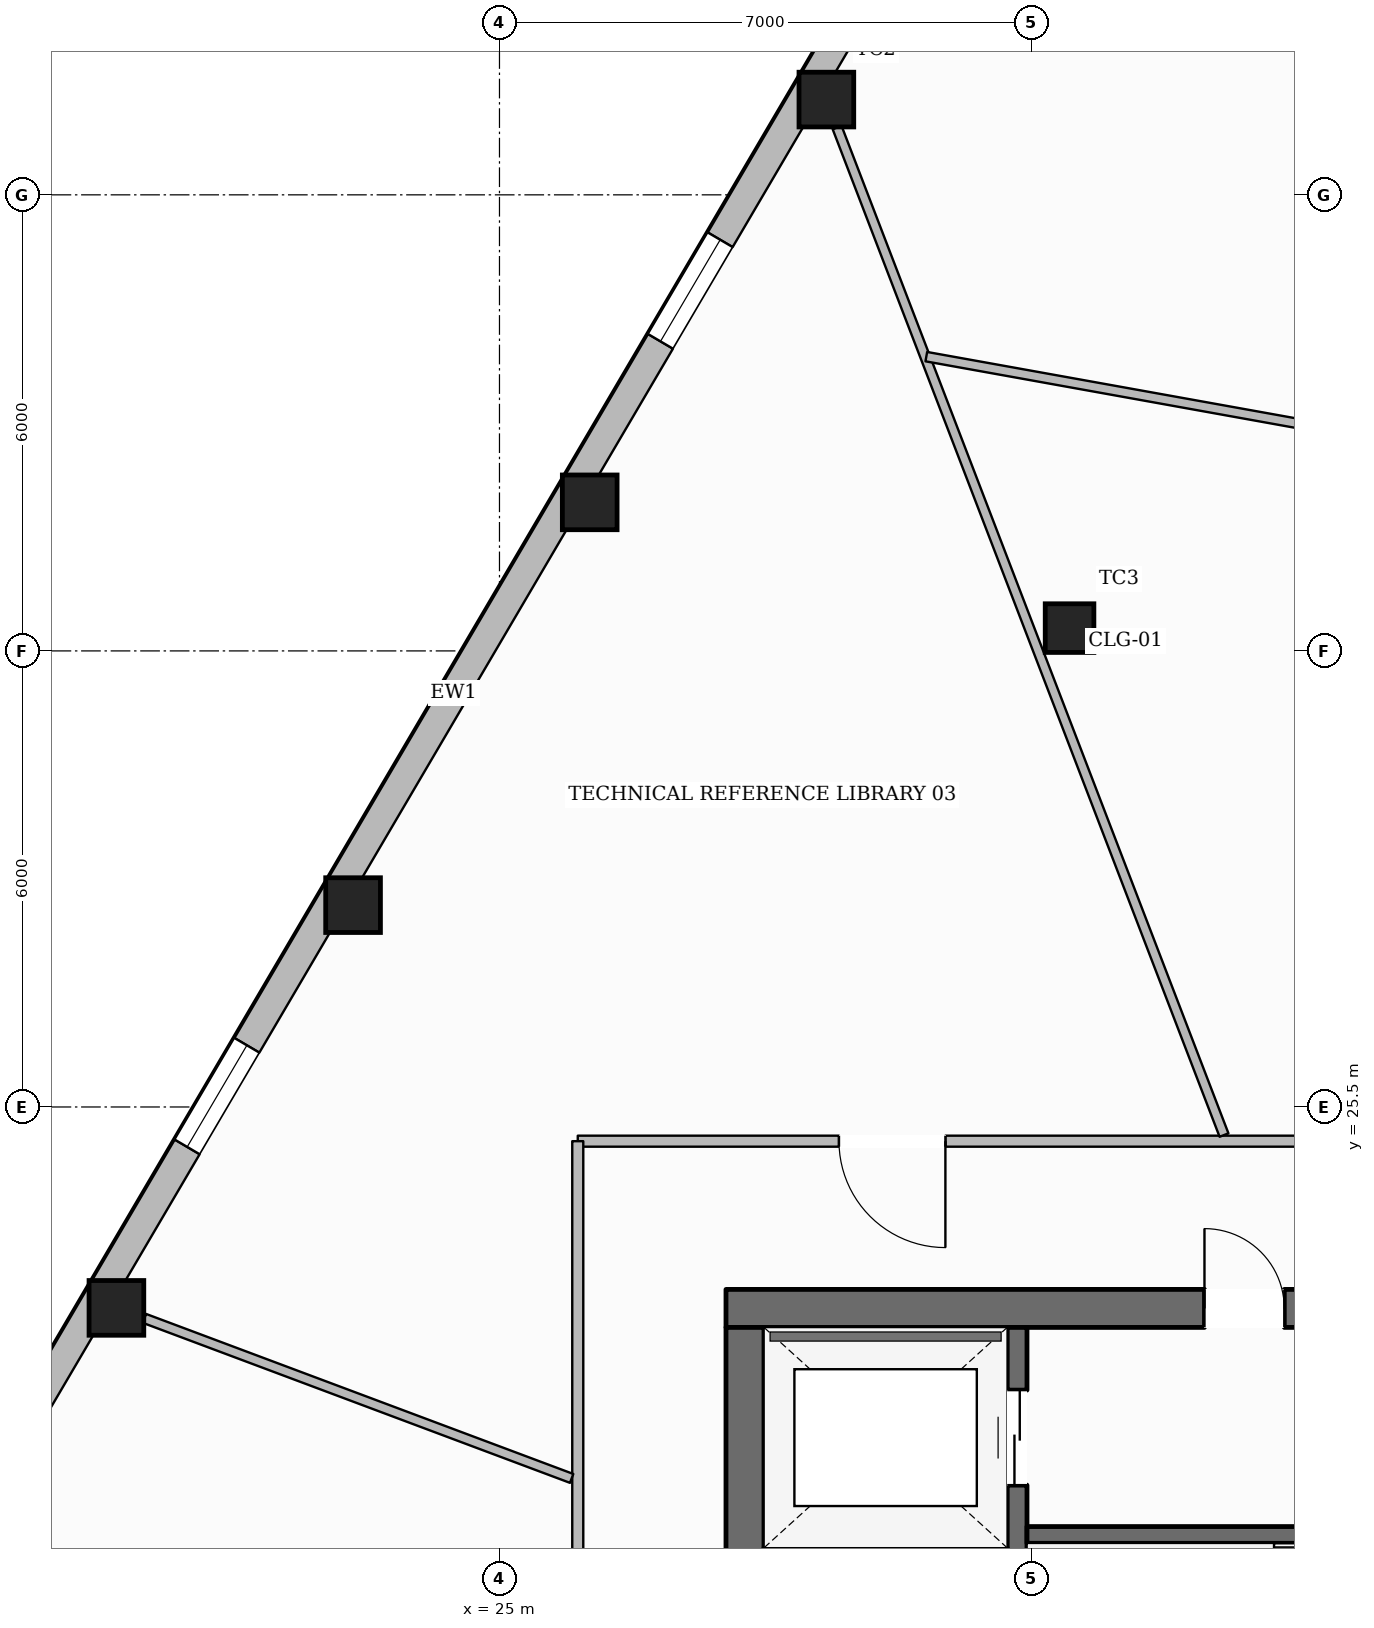
"""IFC4 building model, lengths in metres.
Left out: names, types, materials, properties, quantities, classifications, styles, units other than length and angle.
Written with IfcOpenShell. Run it as: python <this file> out.ifc"""

import sys

from ifc_helpers import new_model, si_unit, direction, frame, frame_2d, origin, origin_2d, place, context, subcontext, project, spatial, rectangle, hollow_rectangle, extrude, element, fill, save


model = new_model("IFC4")
c1 = context("Model", 3, precision=1e-05, world=origin(), true_north=direction((0.0, 1.0)))
c2 = subcontext(c1, "Body", "Model", "MODEL_VIEW")
j1 = project(units=[si_unit("LENGTHUNIT", "METRE"), si_unit("PLANEANGLEUNIT", "RADIAN")], contexts=[c1])
p1 = place(None, origin())
s1 = spatial("IfcSite", under=j1, at=p1, CompositionType="ELEMENT")
p2 = place(p1, origin())
s2 = spatial("IfcBuilding", under=s1, at=p2, CompositionType="ELEMENT")
p3 = place(p2, frame((0.0, 0.0, 139.4)))
s3 = spatial("IfcBuildingStorey", under=s2, at=p3, CompositionType="ELEMENT", Elevation=139.4)
p4 = place(p3, frame((27.98, 22.85, 0.0), z_axis=(0.0, 0.0, 1.0), x_axis=(1.0, 0.0, 0.0)))
e1 = element("IfcWall", 1, at=p4, inside=s3, PredefinedType="SOLIDWALL", context=c2, shape_type="SweptSolid", body=[
    extrude(rectangle(XDim=20.04, YDim=0.5, at=frame_2d((10.02, 0.0))), origin(), (0.0, 0.0, 1.0), 3.6),
])
p5 = place(p4, frame((6.295, 0.0, 0.0)))
e2 = element("IfcOpeningElement", 2, at=p5, cuts=e1, PredefinedType="OPENING", context=c2, shape_type="SweptSolid", body=[
    extrude(rectangle(XDim=1.05, YDim=2.15, at=frame_2d((0.525, 1.075))), frame((0.0, 0.26, 0.0), z_axis=(0.0, -1.0, 0.0), x_axis=(1.0, 0.0, 0.0)), (0.0, 0.0, 1.0), 0.52),
])
p6 = place(p4, frame((12.695, 0.0, 0.0)))
e3 = element("IfcOpeningElement", 3, at=p6, cuts=e1, PredefinedType="OPENING", context=c2, shape_type="SweptSolid", body=[
    extrude(rectangle(XDim=1.05, YDim=2.15, at=frame_2d((0.525, 1.075))), frame((0.0, 0.26, 0.0), z_axis=(0.0, -1.0, 0.0), x_axis=(1.0, 0.0, 0.0)), (0.0, 0.0, 1.0), 0.52),
])
p7 = place(p3, frame((28.23, 9.6, 0.0), z_axis=(0.0, 0.0, 1.0), x_axis=(0.0, 1.0, 0.0)))
e4 = element("IfcWall", 4, at=p7, inside=s3, PredefinedType="SOLIDWALL", context=c2, shape_type="SweptSolid", body=[
    extrude(rectangle(XDim=13.0, YDim=0.5, at=frame_2d((6.5, 0.0))), origin(), (0.0, 0.0, 1.0), 3.6),
])
p8 = place(p7, frame((0.2, 0.0, 0.0)))
e5 = element("IfcOpeningElement", 5, at=p8, cuts=e4, PredefinedType="OPENING", context=c2, shape_type="SweptSolid", body=[
    extrude(rectangle(XDim=1.1, YDim=2.15, at=frame_2d((0.55, 1.075))), frame((0.0, 0.26, 0.0), z_axis=(0.0, -1.0, 0.0), x_axis=(1.0, 0.0, 0.0)), (0.0, 0.0, 1.0), 0.52),
])
p9 = place(p7, frame((8.4, 0.0, 0.0)))
e6 = element("IfcOpeningElement", 6, at=p9, cuts=e4, PredefinedType="OPENING", context=c2, shape_type="SweptSolid", body=[
    extrude(rectangle(XDim=0.9, YDim=2.1, at=frame_2d((0.45, 1.05))), frame((0.0, 0.26, 0.0), z_axis=(0.0, -1.0, 0.0), x_axis=(1.0, 0.0, 0.0)), (0.0, 0.0, 1.0), 0.52),
])
p10 = place(p3, frame((31.81, 9.6, 0.0), z_axis=(0.0, 0.0, 1.0), x_axis=(0.0, 1.0, 0.0)))
e7 = element("IfcWall", 7, at=p10, inside=s3, PredefinedType="SHEAR", context=c2, shape_type="SweptSolid", body=[
    extrude(rectangle(XDim=13.0, YDim=0.26, at=frame_2d((6.5, 0.0))), origin(), (0.0, 0.0, 1.0), 3.6),
])
p11 = place(p10, frame((10.925, 0.0, 0.0)))
e8 = element("IfcOpeningElement", 8, at=p11, cuts=e7, PredefinedType="OPENING", context=c2, shape_type="SweptSolid", body=[
    extrude(rectangle(XDim=1.25, YDim=2.25, at=frame_2d((0.625, 1.125))), frame((0.0, 0.14, 0.0), z_axis=(0.0, -1.0, 0.0), x_axis=(1.0, 0.0, 0.0)), (0.0, 0.0, 1.0), 0.28),
])
p12 = place(p3, frame((28.48, 19.57, 0.0), z_axis=(0.0, 0.0, 1.0), x_axis=(1.0, 0.0, 0.0)))
e9 = element("IfcWall", 9, at=p12, inside=s3, PredefinedType="SHEAR", context=c2, shape_type="SweptSolid", body=[
    extrude(rectangle(XDim=3.2, YDim=0.26, at=frame_2d((1.6, 0.0))), origin(), (0.0, 0.0, 1.0), 3.6),
])
p13 = place(p3, frame((31.94, 19.87, 0.0), z_axis=(0.0, 0.0, 1.0), x_axis=(1.0, 0.0, 0.0)))
e10 = element("IfcWall", 10, at=p13, inside=s3, PredefinedType="SOLIDWALL", context=c2, shape_type="SweptSolid", body=[
    extrude(rectangle(XDim=12.12, YDim=0.22, at=frame_2d((6.06, 0.0))), origin(), (0.0, 0.0, 1.0), 3.6),
])
p14 = place(p13, frame((6.3, 0.0, 0.0)))
e11 = element("IfcOpeningElement", 11, at=p14, cuts=e10, PredefinedType="OPENING", context=c2, shape_type="SweptSolid", body=[
    extrude(rectangle(XDim=1.1, YDim=2.15, at=frame_2d((0.55, 1.075))), frame((0.0, 0.12, 0.0), z_axis=(0.0, -1.0, 0.0), x_axis=(1.0, 0.0, 0.0)), (0.0, 0.0, 1.0), 0.24),
])
p15 = place(p13, frame((8.23, 0.0, 0.0)))
e12 = element("IfcOpeningElement", 12, at=p15, cuts=e10, PredefinedType="OPENING", context=c2, shape_type="SweptSolid", body=[
    extrude(rectangle(XDim=0.9, YDim=2.1, at=frame_2d((0.45, 1.05))), frame((0.0, 0.12, 0.0), z_axis=(0.0, -1.0, 0.0), x_axis=(1.0, 0.0, 0.0)), (0.0, 0.0, 1.0), 0.24),
])
p16 = place(p13, frame((10.45, 0.0, 0.0)))
e13 = element("IfcOpeningElement", 13, at=p16, cuts=e10, PredefinedType="OPENING", context=c2, shape_type="SweptSolid", body=[
    extrude(rectangle(XDim=0.9, YDim=2.1, at=frame_2d((0.45, 1.05))), frame((0.0, 0.12, 0.0), z_axis=(0.0, -1.0, 0.0), x_axis=(1.0, 0.0, 0.0)), (0.0, 0.0, 1.0), 0.24),
])
for number, where, z_axis, x_axis in (
    (14, (29.301, 38.753, 0.0), (0.0, 0.0, 1.0), (1.0, 0.0, 0.0)),
    (15, (26.187, 33.454, 0.0), (0.0, 0.0, 1.0), (1.0, 0.0, 0.0)),
    (16, (23.074, 28.156, 0.0), (0.0, 0.0, 1.0), (1.0, 0.0, 0.0)),
    (17, (19.96, 22.857, 0.0), (0.0, 0.0, 1.0), (1.0, 0.0, 0.0)),
):
    element("IfcColumn", number, at=place(p3, frame(where, z_axis=z_axis, x_axis=x_axis)), inside=s3, PredefinedType="COLUMN", context=c2, shape_type="SweptSolid", body=[
        extrude(hollow_rectangle(XDim=0.72, YDim=0.72, WallThickness=0.032, at=origin_2d()), origin(), (0.0, 0.0, 1.0), 3.6),
    ])
p17 = place(p3, frame((32.5, 31.8, 0.0), z_axis=(0.0, 0.0, 1.0), x_axis=(1.0, 0.0, 0.0)))
e18 = element("IfcColumn", 18, at=p17, inside=s3, PredefinedType="COLUMN", context=c2, shape_type="SweptSolid", body=[
    extrude(hollow_rectangle(XDim=0.64, YDim=0.64, WallThickness=0.028, at=origin_2d()), origin(), (0.0, 0.0, 1.0), 3.6),
])
p18 = place(p3, frame((13.257, 11.982, 0.0), z_axis=(0.0, 0.0, 1.0), x_axis=(0.506593608381, 0.862184966204, 0.0)))
e19 = element("IfcWall", 19, at=p18, inside=s3, PredefinedType="STANDARD", context=c2, shape_type="SweptSolid", body=[
    extrude(rectangle(XDim=37.828, YDim=0.38, at=frame_2d((18.914, 0.0))), origin(), (0.0, 0.0, 1.0), 3.059),
])
p19 = place(p18, frame((33.507, 0.0, 0.65)))
e20 = element("IfcOpeningElement", 20, at=p19, cuts=e19, PredefinedType="OPENING", context=c2, shape_type="SweptSolid", body=[
    extrude(rectangle(XDim=1.55, YDim=1.75, at=frame_2d((0.775, 0.875))), frame((0.0, 0.2, 0.0), z_axis=(0.0, -1.0, 0.0), x_axis=(1.0, 0.0, 0.0)), (0.0, 0.0, 1.0), 0.4),
])
p20 = place(p18, frame((27.362, 0.0, 0.65)))
e21 = element("IfcOpeningElement", 21, at=p20, cuts=e19, PredefinedType="OPENING", context=c2, shape_type="SweptSolid", body=[
    extrude(rectangle(XDim=1.55, YDim=1.75, at=frame_2d((0.775, 0.875))), frame((0.0, 0.2, 0.0), z_axis=(0.0, -1.0, 0.0), x_axis=(1.0, 0.0, 0.0)), (0.0, 0.0, 1.0), 0.4),
])
p21 = place(p18, frame((15.07, 0.0, 0.65)))
e22 = element("IfcOpeningElement", 22, at=p21, cuts=e19, PredefinedType="OPENING", context=c2, shape_type="SweptSolid", body=[
    extrude(rectangle(XDim=1.55, YDim=1.75, at=frame_2d((0.775, 0.875))), frame((0.0, 0.2, 0.0), z_axis=(0.0, -1.0, 0.0), x_axis=(1.0, 0.0, 0.0)), (0.0, 0.0, 1.0), 0.4),
])
p22 = place(p18, frame((8.924, 0.0, 0.65)))
e23 = element("IfcOpeningElement", 23, at=p22, cuts=e19, PredefinedType="OPENING", context=c2, shape_type="SweptSolid", body=[
    extrude(rectangle(XDim=1.55, YDim=1.75, at=frame_2d((0.775, 0.875))), frame((0.0, 0.2, 0.0), z_axis=(0.0, -1.0, 0.0), x_axis=(1.0, 0.0, 0.0)), (0.0, 0.0, 1.0), 0.4),
])
p23 = place(p18, frame((2.778, 0.0, 0.65)))
e24 = element("IfcOpeningElement", 24, at=p23, cuts=e19, PredefinedType="OPENING", context=c2, shape_type="SweptSolid", body=[
    extrude(rectangle(XDim=1.55, YDim=1.75, at=frame_2d((0.775, 0.875))), frame((0.0, 0.2, 0.0), z_axis=(0.0, -1.0, 0.0), x_axis=(1.0, 0.0, 0.0)), (0.0, 0.0, 1.0), 0.4),
])
p24 = place(p3, frame((49.97, 25.05, 0.0), z_axis=(0.0, 0.0, 1.0), x_axis=(-1.0, 0.0, 0.0)))
e25 = element("IfcWall", 25, at=p24, inside=s3, PredefinedType="PARTITIONING", context=c2, shape_type="SweptSolid", body=[
    extrude(rectangle(XDim=23.94, YDim=0.145, at=frame_2d((11.97, 0.0))), origin(), (0.0, 0.0, 1.0), 3.6),
])
p25 = place(p24, frame((6.883, 0.0, 0.0)))
e26 = element("IfcOpeningElement", 26, at=p25, cuts=e25, PredefinedType="OPENING", context=c2, shape_type="SweptSolid", body=[
    extrude(rectangle(XDim=1.4, YDim=2.2, at=frame_2d((0.7, 1.1))), frame((0.0, 0.083, 0.0), z_axis=(0.0, -1.0, 0.0), x_axis=(1.0, 0.0, 0.0)), (0.0, 0.0, 1.0), 0.165),
])
p26 = place(p24, frame((19.104, 0.0, 0.0)))
e27 = element("IfcOpeningElement", 27, at=p26, cuts=e25, PredefinedType="OPENING", context=c2, shape_type="SweptSolid", body=[
    extrude(rectangle(XDim=1.4, YDim=2.2, at=frame_2d((0.7, 1.1))), frame((0.0, 0.083, 0.0), z_axis=(0.0, -1.0, 0.0), x_axis=(1.0, 0.0, 0.0)), (0.0, 0.0, 1.0), 0.165),
])
p27 = place(p3, frame((26.03, 25.05, 0.0), z_axis=(0.0, 0.0, 1.0), x_axis=(0.0, -1.0, 0.0)))
e28 = element("IfcWall", 28, at=p27, inside=s3, PredefinedType="PARTITIONING", context=c2, shape_type="SweptSolid", body=[
    extrude(rectangle(XDim=17.9, YDim=0.145, at=frame_2d((8.95, 0.0))), origin(), (0.0, 0.0, 1.0), 3.288),
])
p28 = place(p27, frame((8.676, 0.0, 0.0)))
e29 = element("IfcOpeningElement", 29, at=p28, cuts=e28, PredefinedType="OPENING", context=c2, shape_type="SweptSolid", body=[
    extrude(rectangle(XDim=1.4, YDim=2.2, at=frame_2d((0.7, 1.1))), frame((0.0, 0.083, 0.0), z_axis=(0.0, -1.0, 0.0), x_axis=(1.0, 0.0, 0.0)), (0.0, 0.0, 1.0), 0.165),
])
p29 = place(p3, frame((34.532, 25.131, 0.0), z_axis=(0.0, 0.0, 1.0), x_axis=(-0.358497395802, 0.933530726438, 0.0)))
e30 = element("IfcWall", 30, at=p29, inside=s3, PredefinedType="PARTITIONING", context=c2, shape_type="SweptSolid", body=[
    extrude(rectangle(XDim=14.198, YDim=0.125, at=frame_2d((7.099, 0.0))), origin(), (0.0, 0.0, 1.0), 3.141),
])
p30 = place(p3, frame((25.949, 20.614, 0.0), z_axis=(0.0, 0.0, 1.0), x_axis=(-0.936462830217, 0.350766827996, 0.0)))
e31 = element("IfcWall", 31, at=p30, inside=s3, PredefinedType="PARTITIONING", context=c2, shape_type="SweptSolid", body=[
    extrude(rectangle(XDim=6.002, YDim=0.125, at=frame_2d((3.001, 0.0))), origin(), (0.0, 0.0, 1.0), 3.6),
])
p31 = place(p3, frame((50.79, 31.741, 0.0), z_axis=(0.0, 0.0, 1.0), x_axis=(-0.984196030072, 0.177082394355, 0.0)))
e32 = element("IfcWall", 32, at=p31, inside=s3, PredefinedType="PARTITIONING", context=c2, shape_type="SweptSolid", body=[
    extrude(rectangle(XDim=20.498, YDim=0.125, at=frame_2d((10.249, 0.0))), origin(), (0.0, 0.0, 1.0), 3.288),
])
p32 = place(p31, frame((9.618, 0.0, 0.0)))
e33 = element("IfcOpeningElement", 33, at=p32, cuts=e32, PredefinedType="OPENING", context=c2, shape_type="SweptSolid", body=[
    extrude(rectangle(XDim=1.02, YDim=2.15, at=frame_2d((0.51, 1.075))), frame((0.0, 0.073, 0.0), z_axis=(0.0, -1.0, 0.0), x_axis=(1.0, 0.0, 0.0)), (0.0, 0.0, 1.0), 0.145),
])
p33 = place(p20, origin())
e34 = element("IfcWindow", 34, at=p33, inside=s3, PartitioningType="SINGLE_PANEL", PredefinedType="WINDOW", context=c2, shape_type="SweptSolid", body=[
    extrude(rectangle(XDim=1.55, YDim=1.75, at=frame_2d((0.775, 0.875))), frame((0.0, 0.03, 0.0), z_axis=(0.0, -1.0, 0.0), x_axis=(1.0, 0.0, 0.0)), (0.0, 0.0, 1.0), 0.06),
])
fill(e21, e34)
p34 = place(p21, origin())
e35 = element("IfcWindow", 35, at=p34, inside=s3, PartitioningType="SINGLE_PANEL", PredefinedType="WINDOW", context=c2, shape_type="SweptSolid", body=[
    extrude(rectangle(XDim=1.55, YDim=1.75, at=frame_2d((0.775, 0.875))), frame((0.0, 0.03, 0.0), z_axis=(0.0, -1.0, 0.0), x_axis=(1.0, 0.0, 0.0)), (0.0, 0.0, 1.0), 0.06),
])
fill(e22, e35)
p35 = place(p5, origin())
e36 = element("IfcDoor", 36, at=p35, inside=s3, OperationType="SINGLE_SWING_LEFT", PredefinedType="DOOR", context=c2, shape_type="SweptSolid", body=[
    extrude(rectangle(XDim=1.05, YDim=2.15, at=frame_2d((0.525, 1.075))), frame((0.0, 0.025, 0.0), z_axis=(0.0, -1.0, 0.0), x_axis=(1.0, 0.0, 0.0)), (0.0, 0.0, 1.0), 0.05),
])
fill(e2, e36)
p36 = place(p11, origin())
e37 = element("IfcDoor", 37, at=p36, inside=s3, OperationType="DOUBLE_DOOR_SLIDING", PredefinedType="DOOR", context=c2, shape_type="SweptSolid", body=[
    extrude(rectangle(XDim=1.25, YDim=2.25, at=frame_2d((0.625, 1.125))), frame((0.0, 0.025, 0.0), z_axis=(0.0, -1.0, 0.0), x_axis=(1.0, 0.0, 0.0)), (0.0, 0.0, 1.0), 0.05),
])
fill(e8, e37)
p37 = place(p26, origin())
e38 = element("IfcDoor", 38, at=p37, inside=s3, OperationType="SINGLE_SWING_LEFT", PredefinedType="DOOR", context=c2, shape_type="SweptSolid", body=[
    extrude(rectangle(XDim=1.4, YDim=2.2, at=frame_2d((0.7, 1.1))), frame((0.0, 0.025, 0.0), z_axis=(0.0, -1.0, 0.0), x_axis=(1.0, 0.0, 0.0)), (0.0, 0.0, 1.0), 0.05),
])
fill(e27, e38)
save(model, sys.argv[1])
